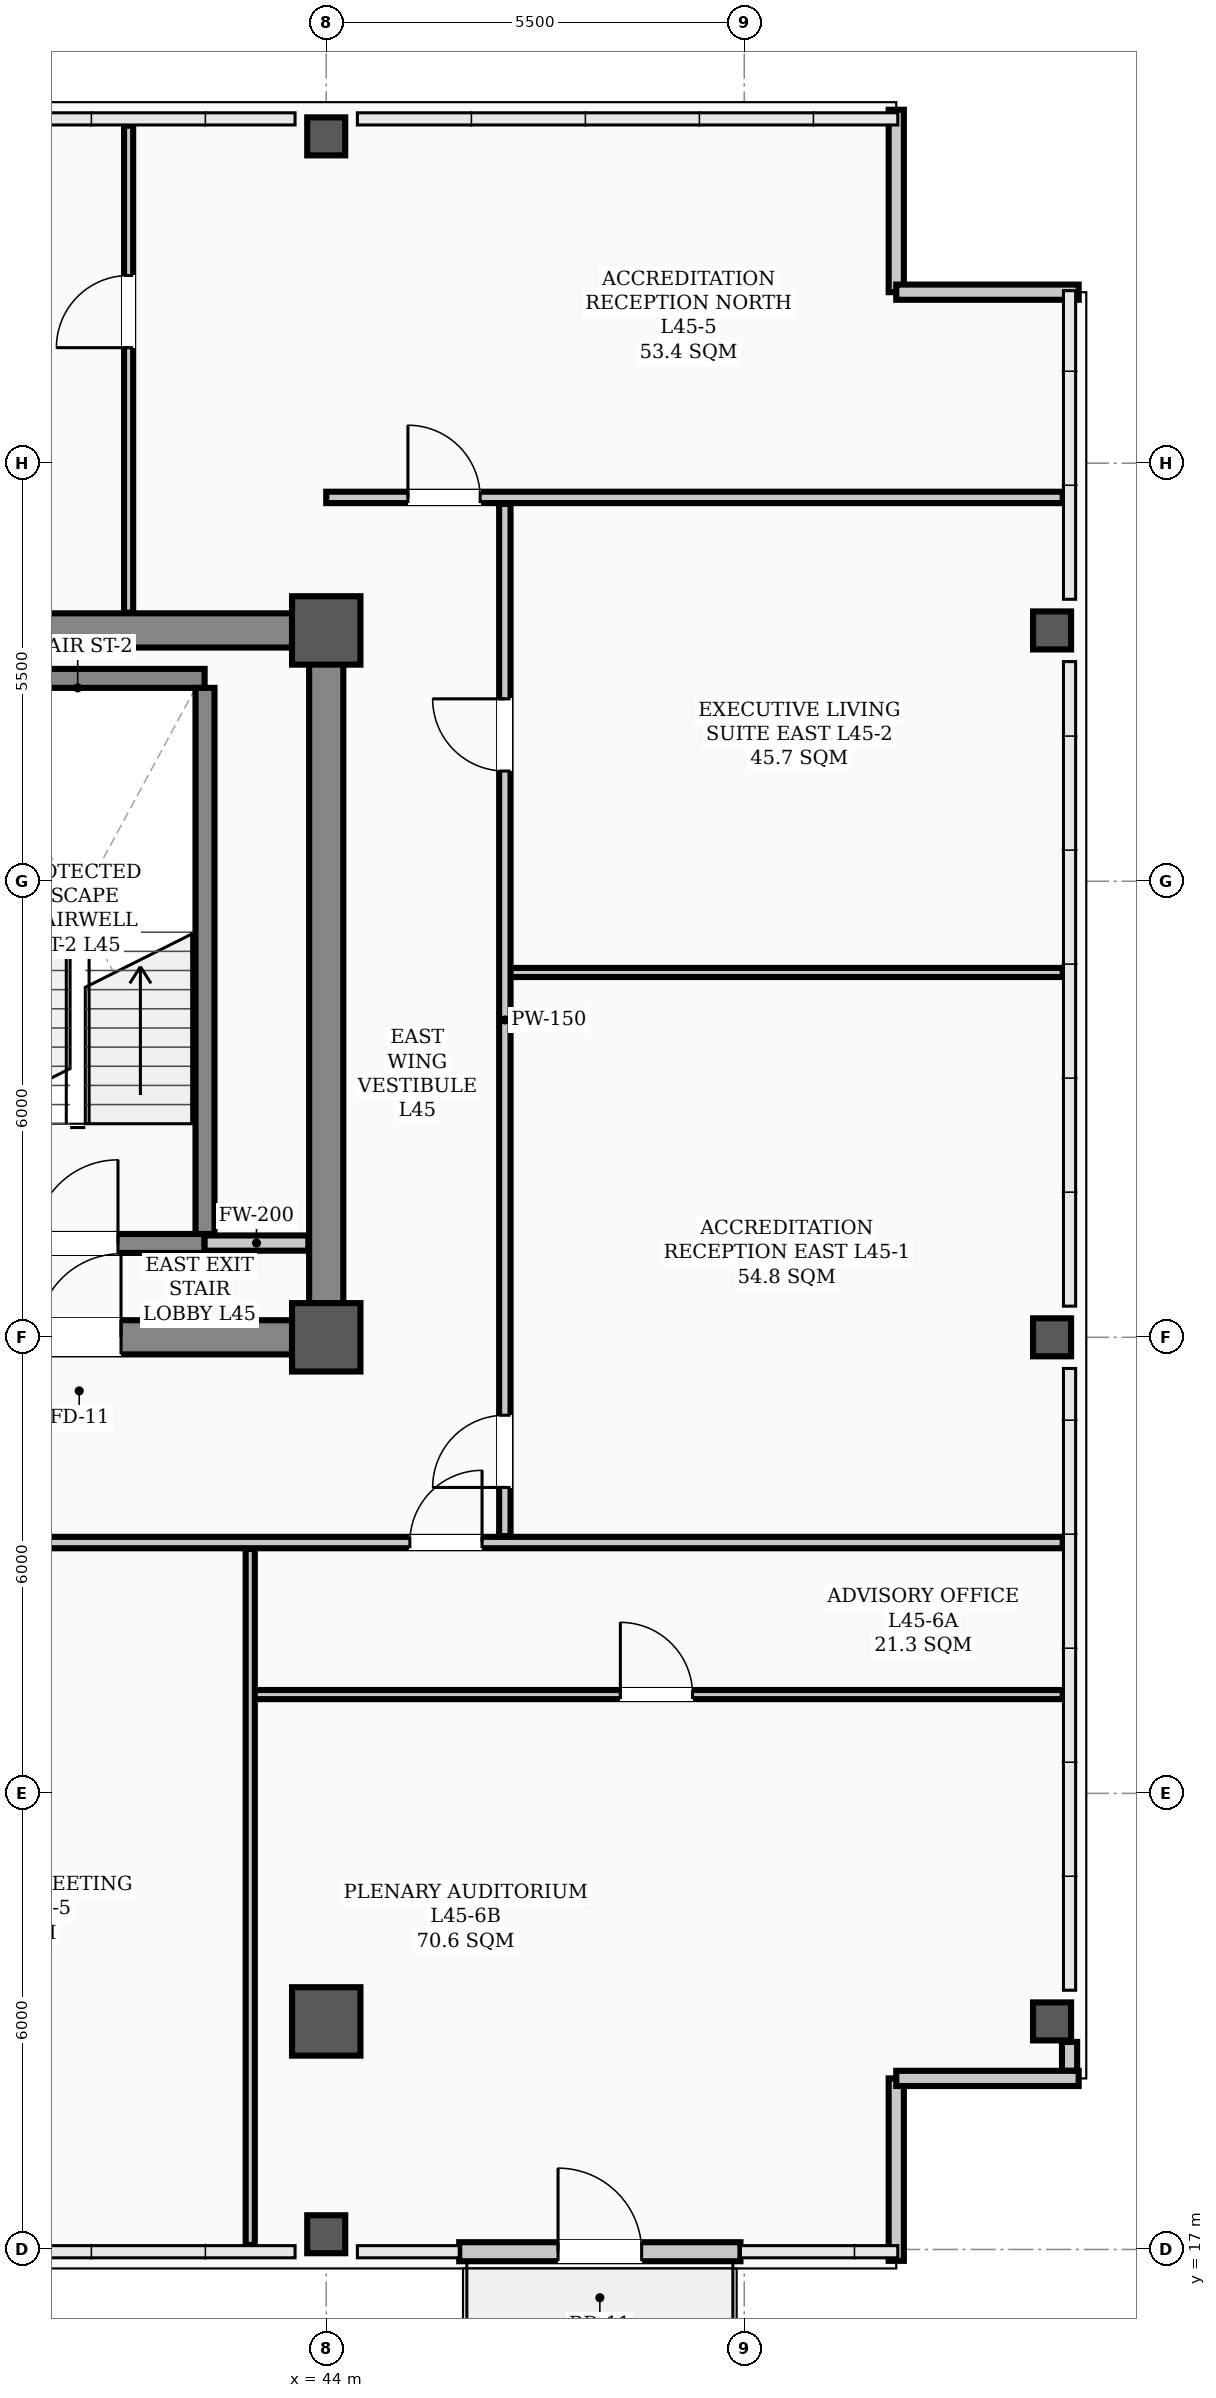
"""IFC4 building model, lengths in metres.
Left out: names, types, materials, properties, quantities, classifications, styles, units other than length and angle.
Written with IfcOpenShell. Run it as: python <this file> out.ifc"""

import sys

from ifc_helpers import new_model, si_unit, direction, frame, frame_2d, origin, origin_2d, place, context, subcontext, project, spatial, rectangle, hollow_rectangle, extrude, element, fill, save


model = new_model("IFC4")
c1 = context("Model", 3, precision=1e-05, world=origin(), true_north=direction((0.0, 1.0)))
c2 = subcontext(c1, "Body", "Model", "MODEL_VIEW")
j1 = project(units=[si_unit("LENGTHUNIT", "METRE"), si_unit("PLANEANGLEUNIT", "RADIAN")], contexts=[c1])
p1 = place(None, origin())
s1 = spatial("IfcSite", under=j1, at=p1, CompositionType="ELEMENT")
p2 = place(p1, origin())
s2 = spatial("IfcBuilding", under=s1, at=p2, CompositionType="ELEMENT")
p3 = place(p2, frame((0.0, 0.0, 181.2)))
s3 = spatial("IfcBuildingStorey", under=s2, at=p3, CompositionType="ELEMENT", Elevation=181.2)
for number, where, z_axis, x_axis in (
    (1, (44.0, 29.0, 0.0), (0.0, 0.0, 1.0), (1.0, 0.0, 0.0)),
    (2, (44.0, 38.3, 0.0), (0.0, 0.0, 1.0), (1.0, 0.0, 0.0)),
    (3, (44.0, 20.0, 0.0), (0.0, 0.0, 1.0), (1.0, 0.0, 0.0)),
):
    element("IfcColumn", number, at=place(p3, frame(where, z_axis=z_axis, x_axis=x_axis)), inside=s3, PredefinedType="COLUMN", context=c2, shape_type="SweptSolid", body=[
        extrude(hollow_rectangle(XDim=0.9, YDim=0.9, WallThickness=0.035, InnerFilletRadius=0.017, OuterFilletRadius=0.052, at=origin_2d()), origin(), (0.0, 0.0, 1.0), 3.9),
    ])
for number, where, z_axis, x_axis in (
    (4, (44.0, 17.2, 0.0), (0.0, 0.0, 1.0), (1.0, 0.0, 0.0)),
    (5, (44.0, 44.8, 0.0), (0.0, 0.0, 1.0), (1.0, 0.0, 0.0)),
    (6, (53.55, 20.0, 0.0), (0.0, 0.0, 1.0), (1.0, 0.0, 0.0)),
    (7, (53.55, 29.0, 0.0), (0.0, 0.0, 1.0), (1.0, 0.0, 0.0)),
    (8, (53.55, 38.3, 0.0), (0.0, 0.0, 1.0), (1.0, 0.0, 0.0)),
):
    element("IfcColumn", number, at=place(p3, frame(where, z_axis=z_axis, x_axis=x_axis)), inside=s3, PredefinedType="COLUMN", context=c2, shape_type="SweptSolid", body=[
        extrude(hollow_rectangle(XDim=0.5, YDim=0.5, WallThickness=0.024, InnerFilletRadius=0.012, OuterFilletRadius=0.036, at=origin_2d()), origin(), (0.0, 0.0, 1.0), 3.9),
    ])
p4 = place(p3, frame((53.78, 19.35, 0.0), z_axis=(0.0, 0.0, 1.0), x_axis=(0.0, 1.0, 0.0)))
e9 = element("IfcWall", 9, at=p4, inside=s3, PredefinedType="PARAPET", context=c2, shape_type="SweptSolid", body=[
    extrude(rectangle(XDim=0.38, YDim=0.2, at=frame_2d((0.19, 0.0))), origin(), (0.0, 0.0, 1.0), 1.2),
])
for number, where, z_axis, x_axis in (
    (10, (51.5, 16.85, 0.0), (0.0, 0.0, 1.0), (0.0, 1.0, 0.0)),
    (11, (51.5, 19.25, 0.0), (0.0, 0.0, 1.0), (1.0, 0.0, 0.0)),
    (12, (51.5, 45.15, 0.0), (0.0, 0.0, 1.0), (0.0, -1.0, 0.0)),
    (13, (51.5, 42.75, 0.0), (0.0, 0.0, 1.0), (1.0, 0.0, 0.0)),
):
    element("IfcWall", number, at=place(p3, frame(where, z_axis=z_axis, x_axis=x_axis)), inside=s3, PredefinedType="PARAPET", context=c2, shape_type="SweptSolid", body=[
        extrude(rectangle(XDim=2.4, YDim=0.2, at=frame_2d((1.2, 0.0))), origin(), (0.0, 0.0, 1.0), 1.2),
    ])
p5 = place(p3, frame((45.75, 16.97, 0.0), z_axis=(0.0, 0.0, 1.0), x_axis=(1.0, 0.0, 0.0)))
e14 = element("IfcWall", 14, at=p5, inside=s3, PredefinedType="STANDARD", context=c2, shape_type="SweptSolid", body=[
    extrude(rectangle(XDim=3.7, YDim=0.25, at=frame_2d((1.85, 0.0))), origin(), (0.0, 0.0, 1.0), 3.18),
])
p6 = place(p5, frame((1.3, 0.0, 0.0)))
e15 = element("IfcOpeningElement", 15, at=p6, cuts=e14, PredefinedType="OPENING", context=c2, shape_type="SweptSolid", body=[
    extrude(rectangle(XDim=1.1, YDim=2.2, at=frame_2d((0.55, 1.1))), frame((0.0, 0.135, 0.0), z_axis=(0.0, -1.0, 0.0), x_axis=(1.0, 0.0, 0.0)), (0.0, 0.0, 1.0), 0.27),
])
p7 = place(p3, frame((13.5, 29.0, 0.0), z_axis=(0.0, 0.0, 1.0), x_axis=(1.0, 0.0, 0.0)))
e16 = element("IfcWall", 16, at=p7, inside=s3, PredefinedType="SHEAR", context=c2, shape_type="SweptSolid", body=[
    extrude(rectangle(XDim=30.5, YDim=0.45, at=frame_2d((15.25, 0.0))), origin(), (0.0, 0.0, 1.0), 3.72),
])
p8 = place(p7, frame((1.75, 0.0, 0.0)))
e17 = element("IfcOpeningElement", 17, at=p8, cuts=e16, PredefinedType="OPENING", context=c2, shape_type="SweptSolid", body=[
    extrude(rectangle(XDim=1.1, YDim=2.08, at=frame_2d((0.55, 1.04))), frame((0.0, 0.235, 0.0), z_axis=(0.0, -1.0, 0.0), x_axis=(1.0, 0.0, 0.0)), (0.0, 0.0, 1.0), 0.47),
])
p9 = place(p7, frame((26.7, 0.0, 0.0)))
e18 = element("IfcOpeningElement", 18, at=p9, cuts=e16, PredefinedType="OPENING", context=c2, shape_type="SweptSolid", body=[
    extrude(rectangle(XDim=1.1, YDim=2.08, at=frame_2d((0.55, 1.04))), frame((0.0, 0.235, 0.0), z_axis=(0.0, -1.0, 0.0), x_axis=(1.0, 0.0, 0.0)), (0.0, 0.0, 1.0), 0.47),
])
p10 = place(p7, frame((6.8, 0.0, 0.0)))
e19 = element("IfcOpeningElement", 19, at=p10, cuts=e16, PredefinedType="OPENING", context=c2, shape_type="SweptSolid", body=[
    extrude(rectangle(XDim=1.1, YDim=2.08, at=frame_2d((0.55, 1.04))), frame((0.0, 0.235, 0.0), z_axis=(0.0, -1.0, 0.0), x_axis=(1.0, 0.0, 0.0)), (0.0, 0.0, 1.0), 0.47),
])
p11 = place(p7, frame((13.2, 0.0, 0.0)))
e20 = element("IfcOpeningElement", 20, at=p11, cuts=e16, PredefinedType="OPENING", context=c2, shape_type="SweptSolid", body=[
    extrude(rectangle(XDim=1.6, YDim=2.08, at=frame_2d((0.8, 1.04))), frame((0.0, 0.235, 0.0), z_axis=(0.0, -1.0, 0.0), x_axis=(1.0, 0.0, 0.0)), (0.0, 0.0, 1.0), 0.47),
])
p12 = place(p7, frame((19.5, 0.0, 0.0)))
e21 = element("IfcOpeningElement", 21, at=p12, cuts=e16, PredefinedType="OPENING", context=c2, shape_type="SweptSolid", body=[
    extrude(rectangle(XDim=0.9, YDim=2.08, at=frame_2d((0.45, 1.04))), frame((0.0, 0.235, 0.0), z_axis=(0.0, -1.0, 0.0), x_axis=(1.0, 0.0, 0.0)), (0.0, 0.0, 1.0), 0.47),
])
p13 = place(p7, frame((21.55, 0.0, 0.0)))
e22 = element("IfcOpeningElement", 22, at=p13, cuts=e16, PredefinedType="OPENING", context=c2, shape_type="SweptSolid", body=[
    extrude(rectangle(XDim=0.9, YDim=2.08, at=frame_2d((0.45, 1.04))), frame((0.0, 0.235, 0.0), z_axis=(0.0, -1.0, 0.0), x_axis=(1.0, 0.0, 0.0)), (0.0, 0.0, 1.0), 0.47),
])
p14 = place(p3, frame((13.5, 38.3, 0.0), z_axis=(0.0, 0.0, 1.0), x_axis=(1.0, 0.0, 0.0)))
e23 = element("IfcWall", 23, at=p14, inside=s3, PredefinedType="SHEAR", context=c2, shape_type="SweptSolid", body=[
    extrude(rectangle(XDim=30.5, YDim=0.45, at=frame_2d((15.25, 0.0))), origin(), (0.0, 0.0, 1.0), 3.72),
])
p15 = place(p3, frame((44.0, 29.35, 0.0), z_axis=(0.0, 0.0, 1.0), x_axis=(0.0, 1.0, 0.0)))
e24 = element("IfcWall", 24, at=p15, inside=s3, PredefinedType="SHEAR", context=c2, shape_type="SweptSolid", body=[
    extrude(rectangle(XDim=8.6, YDim=0.45, at=frame_2d((4.3, 0.0))), origin(), (0.0, 0.0, 1.0), 3.72),
])
p16 = place(p3, frame((39.06, 30.235, 0.0), z_axis=(0.0, 0.0, 1.0), x_axis=(1.0, 0.0, 0.0)))
e25 = element("IfcWall", 25, at=p16, inside=s3, PredefinedType="STANDARD", context=c2, shape_type="SweptSolid", body=[
    extrude(rectangle(XDim=3.34, YDim=0.25, at=frame_2d((1.67, 0.0))), origin(), (0.0, 0.0, 1.0), 3.72),
])
p17 = place(p16, frame((1.1, 0.0, 0.0)))
e26 = element("IfcOpeningElement", 26, at=p17, cuts=e25, PredefinedType="OPENING", context=c2, shape_type="SweptSolid", body=[
    extrude(rectangle(XDim=1.1, YDim=2.08, at=frame_2d((0.55, 1.04))), frame((0.0, 0.135, 0.0), z_axis=(0.0, -1.0, 0.0), x_axis=(1.0, 0.0, 0.0)), (0.0, 0.0, 1.0), 0.27),
])
p18 = place(p3, frame((39.06, 37.669, 0.0), z_axis=(0.0, 0.0, 1.0), x_axis=(1.0, 0.0, 0.0)))
e27 = element("IfcWall", 27, at=p18, inside=s3, PredefinedType="STANDARD", context=c2, shape_type="SweptSolid", body=[
    extrude(rectangle(XDim=3.34, YDim=0.25, at=frame_2d((1.67, 0.0))), origin(), (0.0, 0.0, 1.0), 3.72),
])
p19 = place(p3, frame((42.405, 30.36, 0.0), z_axis=(0.0, 0.0, 1.0), x_axis=(0.0, 1.0, 0.0)))
e28 = element("IfcWall", 28, at=p19, inside=s3, PredefinedType="STANDARD", context=c2, shape_type="SweptSolid", body=[
    extrude(rectangle(XDim=7.184, YDim=0.25, at=frame_2d((3.592, 0.0))), origin(), (0.0, 0.0, 1.0), 3.72),
])
p20 = place(p3, frame((42.4, 30.24, 0.0), z_axis=(0.0, 0.0, 1.0), x_axis=(1.0, 0.0, 0.0)))
e29 = element("IfcWall", 29, at=p20, inside=s3, PredefinedType="STANDARD", context=c2, shape_type="SweptSolid", body=[
    extrude(rectangle(XDim=1.365, YDim=0.2, at=frame_2d((0.683, 0.0))), origin(), (0.0, 0.0, 1.0), 3.2),
])
p21 = place(p3, frame((10.31, 26.3, 0.0), z_axis=(0.0, 0.0, 1.0), x_axis=(1.0, 0.0, 0.0)))
e30 = element("IfcWall", 30, at=p21, inside=s3, PredefinedType="PARTITIONING", context=c2, shape_type="SweptSolid", body=[
    extrude(rectangle(XDim=43.38, YDim=0.15, at=frame_2d((21.69, 0.0))), origin(), (0.0, 0.0, 1.0), 3.2),
])
p22 = place(p21, frame((0.575, 0.0, 0.0)))
e31 = element("IfcOpeningElement", 31, at=p22, cuts=e30, PredefinedType="OPENING", context=c2, shape_type="SweptSolid", body=[
    extrude(rectangle(XDim=0.95, YDim=2.08, at=frame_2d((0.475, 1.04))), frame((0.0, 0.085, 0.0), z_axis=(0.0, -1.0, 0.0), x_axis=(1.0, 0.0, 0.0)), (0.0, 0.0, 1.0), 0.17),
])
p23 = place(p21, frame((9.415, 0.0, 0.0)))
e32 = element("IfcOpeningElement", 32, at=p23, cuts=e30, PredefinedType="OPENING", context=c2, shape_type="SweptSolid", body=[
    extrude(rectangle(XDim=0.95, YDim=2.08, at=frame_2d((0.475, 1.04))), frame((0.0, 0.085, 0.0), z_axis=(0.0, -1.0, 0.0), x_axis=(1.0, 0.0, 0.0)), (0.0, 0.0, 1.0), 0.17),
])
p24 = place(p21, frame((16.115, 0.0, 0.0)))
e33 = element("IfcOpeningElement", 33, at=p24, cuts=e30, PredefinedType="OPENING", context=c2, shape_type="SweptSolid", body=[
    extrude(rectangle(XDim=0.95, YDim=2.08, at=frame_2d((0.475, 1.04))), frame((0.0, 0.085, 0.0), z_axis=(0.0, -1.0, 0.0), x_axis=(1.0, 0.0, 0.0)), (0.0, 0.0, 1.0), 0.17),
])
p25 = place(p21, frame((22.715, 0.0, 0.0)))
e34 = element("IfcOpeningElement", 34, at=p25, cuts=e30, PredefinedType="OPENING", context=c2, shape_type="SweptSolid", body=[
    extrude(rectangle(XDim=0.95, YDim=2.08, at=frame_2d((0.475, 1.04))), frame((0.0, 0.085, 0.0), z_axis=(0.0, -1.0, 0.0), x_axis=(1.0, 0.0, 0.0)), (0.0, 0.0, 1.0), 0.17),
])
p26 = place(p21, frame((29.015, 0.0, 0.0)))
e35 = element("IfcOpeningElement", 35, at=p26, cuts=e30, PredefinedType="OPENING", context=c2, shape_type="SweptSolid", body=[
    extrude(rectangle(XDim=0.95, YDim=2.08, at=frame_2d((0.475, 1.04))), frame((0.0, 0.085, 0.0), z_axis=(0.0, -1.0, 0.0), x_axis=(1.0, 0.0, 0.0)), (0.0, 0.0, 1.0), 0.17),
])
p27 = place(p21, frame((34.79, 0.0, 0.0)))
e36 = element("IfcOpeningElement", 36, at=p27, cuts=e30, PredefinedType="OPENING", context=c2, shape_type="SweptSolid", body=[
    extrude(rectangle(XDim=0.95, YDim=2.08, at=frame_2d((0.475, 1.04))), frame((0.0, 0.085, 0.0), z_axis=(0.0, -1.0, 0.0), x_axis=(1.0, 0.0, 0.0)), (0.0, 0.0, 1.0), 0.17),
])
p28 = place(p3, frame((43.0, 24.3, 0.0), z_axis=(0.0, 0.0, 1.0), x_axis=(1.0, 0.0, 0.0)))
e37 = element("IfcWall", 37, at=p28, inside=s3, PredefinedType="PARTITIONING", context=c2, shape_type="SweptSolid", body=[
    extrude(rectangle(XDim=10.69, YDim=0.12, at=frame_2d((5.345, 0.0))), origin(), (0.0, 0.0, 1.0), 3.2),
])
p29 = place(p28, frame((4.87, 0.0, 0.0)))
e38 = element("IfcOpeningElement", 38, at=p29, cuts=e37, PredefinedType="OPENING", context=c2, shape_type="SweptSolid", body=[
    extrude(rectangle(XDim=0.95, YDim=2.08, at=frame_2d((0.475, 1.04))), frame((0.0, 0.07, 0.0), z_axis=(0.0, -1.0, 0.0), x_axis=(1.0, 0.0, 0.0)), (0.0, 0.0, 1.0), 0.14),
])
p30 = place(p3, frame((46.35, 33.8, 0.0), z_axis=(0.0, 0.0, 1.0), x_axis=(1.0, 0.0, 0.0)))
e39 = element("IfcWall", 39, at=p30, inside=s3, PredefinedType="PARTITIONING", context=c2, shape_type="SweptSolid", body=[
    extrude(rectangle(XDim=7.34, YDim=0.12, at=frame_2d((3.67, 0.0))), origin(), (0.0, 0.0, 1.0), 3.212),
])
p31 = place(p3, frame((44.0, 40.05, 0.0), z_axis=(0.0, 0.0, 1.0), x_axis=(1.0, 0.0, 0.0)))
e40 = element("IfcWall", 40, at=p31, inside=s3, PredefinedType="PARTITIONING", context=c2, shape_type="SweptSolid", body=[
    extrude(rectangle(XDim=9.69, YDim=0.15, at=frame_2d((4.845, 0.0))), origin(), (0.0, 0.0, 1.0), 3.2),
])
p32 = place(p31, frame((1.075, 0.0, 0.0)))
e41 = element("IfcOpeningElement", 41, at=p32, cuts=e40, PredefinedType="OPENING", context=c2, shape_type="SweptSolid", body=[
    extrude(rectangle(XDim=0.95, YDim=2.08, at=frame_2d((0.475, 1.04))), frame((0.0, 0.085, 0.0), z_axis=(0.0, -1.0, 0.0), x_axis=(1.0, 0.0, 0.0)), (0.0, 0.0, 1.0), 0.17),
])
p33 = place(p3, frame((46.35, 26.385, 0.0), z_axis=(0.0, 0.0, 1.0), x_axis=(0.0, 1.0, 0.0)))
e42 = element("IfcWall", 42, at=p33, inside=s3, PredefinedType="PARTITIONING", context=c2, shape_type="SweptSolid", body=[
    extrude(rectangle(XDim=13.58, YDim=0.15, at=frame_2d((6.79, 0.0))), origin(), (0.0, 0.0, 1.0), 3.1),
])
p34 = place(p33, frame((0.64, 0.0, 0.0)))
e43 = element("IfcOpeningElement", 43, at=p34, cuts=e42, PredefinedType="OPENING", context=c2, shape_type="SweptSolid", body=[
    extrude(rectangle(XDim=0.95, YDim=2.08, at=frame_2d((0.475, 1.04))), frame((0.0, 0.085, 0.0), z_axis=(0.0, -1.0, 0.0), x_axis=(1.0, 0.0, 0.0)), (0.0, 0.0, 1.0), 0.17),
])
p35 = place(p33, frame((10.065, 0.0, 0.0)))
e44 = element("IfcOpeningElement", 44, at=p35, cuts=e42, PredefinedType="OPENING", context=c2, shape_type="SweptSolid", body=[
    extrude(rectangle(XDim=0.95, YDim=2.08, at=frame_2d((0.475, 1.04))), frame((0.0, 0.085, 0.0), z_axis=(0.0, -1.0, 0.0), x_axis=(1.0, 0.0, 0.0)), (0.0, 0.0, 1.0), 0.17),
])
p36 = place(p3, frame((43.0, 17.06, 0.0), z_axis=(0.0, 0.0, 1.0), x_axis=(0.0, 1.0, 0.0)))
e45 = element("IfcWall", 45, at=p36, inside=s3, PredefinedType="PARTITIONING", context=c2, shape_type="SweptSolid", body=[
    extrude(rectangle(XDim=9.155, YDim=0.12, at=frame_2d((4.578, 0.0))), origin(), (0.0, 0.0, 1.0), 3.1),
])
p37 = place(p3, frame((41.4, 38.535, 0.0), z_axis=(0.0, 0.0, 1.0), x_axis=(0.0, 1.0, 0.0)))
e46 = element("IfcWall", 46, at=p37, inside=s3, PredefinedType="PARTITIONING", context=c2, shape_type="SweptSolid", body=[
    extrude(rectangle(XDim=6.405, YDim=0.12, at=frame_2d((3.203, 0.0))), origin(), (0.0, 0.0, 1.0), 3.212),
])
p38 = place(p37, frame((3.485, 0.0, 0.0)))
e47 = element("IfcOpeningElement", 47, at=p38, cuts=e46, PredefinedType="OPENING", context=c2, shape_type="SweptSolid", body=[
    extrude(rectangle(XDim=0.95, YDim=2.08, at=frame_2d((0.475, 1.04))), frame((0.0, 0.07, 0.0), z_axis=(0.0, -1.0, 0.0), x_axis=(1.0, 0.0, 0.0)), (0.0, 0.0, 1.0), 0.14),
])
p39 = place(p6, origin())
e48 = element("IfcDoor", 48, at=p39, inside=s3, OperationType="SINGLE_SWING_LEFT", PredefinedType="DOOR", context=c2, shape_type="SweptSolid", body=[
    extrude(rectangle(XDim=1.1, YDim=2.2, at=frame_2d((0.55, 1.1))), frame((0.0, 0.025, 0.0), z_axis=(0.0, -1.0, 0.0), x_axis=(1.0, 0.0, 0.0)), (0.0, 0.0, 1.0), 0.05),
])
fill(e15, e48)
p40 = place(p17, origin())
e49 = element("IfcDoor", 49, at=p40, inside=s3, OperationType="SINGLE_SWING_RIGHT", PredefinedType="DOOR", context=c2, shape_type="SweptSolid", body=[
    extrude(rectangle(XDim=1.1, YDim=2.08, at=frame_2d((0.55, 1.04))), frame((0.0, 0.025, 0.0), z_axis=(0.0, -1.0, 0.0), x_axis=(1.0, 0.0, 0.0)), (0.0, 0.0, 1.0), 0.05),
])
fill(e26, e49)
p41 = place(p9, origin())
e50 = element("IfcDoor", 50, at=p41, inside=s3, OperationType="SINGLE_SWING_RIGHT", PredefinedType="DOOR", context=c2, shape_type="SweptSolid", body=[
    extrude(rectangle(XDim=1.1, YDim=2.08, at=frame_2d((0.55, 1.04))), frame((0.0, 0.025, 0.0), z_axis=(0.0, -1.0, 0.0), x_axis=(1.0, 0.0, 0.0)), (0.0, 0.0, 1.0), 0.05),
])
fill(e18, e50)
p42 = place(p29, origin())
e51 = element("IfcDoor", 51, at=p42, inside=s3, OperationType="SINGLE_SWING_LEFT", PredefinedType="DOOR", context=c2, shape_type="SweptSolid", body=[
    extrude(rectangle(XDim=0.95, YDim=2.08, at=frame_2d((0.475, 1.04))), frame((0.0, 0.025, 0.0), z_axis=(0.0, -1.0, 0.0), x_axis=(1.0, 0.0, 0.0)), (0.0, 0.0, 1.0), 0.05),
])
fill(e38, e51)
p43 = place(p27, origin())
e52 = element("IfcDoor", 52, at=p43, inside=s3, OperationType="SINGLE_SWING_RIGHT", PredefinedType="DOOR", context=c2, shape_type="SweptSolid", body=[
    extrude(rectangle(XDim=0.95, YDim=2.08, at=frame_2d((0.475, 1.04))), frame((0.0, 0.025, 0.0), z_axis=(0.0, -1.0, 0.0), x_axis=(1.0, 0.0, 0.0)), (0.0, 0.0, 1.0), 0.05),
])
fill(e36, e52)
p44 = place(p34, origin())
e53 = element("IfcDoor", 53, at=p44, inside=s3, OperationType="SINGLE_SWING_LEFT", PredefinedType="DOOR", context=c2, shape_type="SweptSolid", body=[
    extrude(rectangle(XDim=0.95, YDim=2.08, at=frame_2d((0.475, 1.04))), frame((0.0, 0.025, 0.0), z_axis=(0.0, -1.0, 0.0), x_axis=(1.0, 0.0, 0.0)), (0.0, 0.0, 1.0), 0.05),
])
fill(e43, e53)
p45 = place(p35, origin())
e54 = element("IfcDoor", 54, at=p45, inside=s3, OperationType="SINGLE_SWING_RIGHT", PredefinedType="DOOR", context=c2, shape_type="SweptSolid", body=[
    extrude(rectangle(XDim=0.95, YDim=2.08, at=frame_2d((0.475, 1.04))), frame((0.0, 0.025, 0.0), z_axis=(0.0, -1.0, 0.0), x_axis=(1.0, 0.0, 0.0)), (0.0, 0.0, 1.0), 0.05),
])
fill(e44, e54)
p46 = place(p32, origin())
e55 = element("IfcDoor", 55, at=p46, inside=s3, OperationType="SINGLE_SWING_LEFT", PredefinedType="DOOR", context=c2, shape_type="SweptSolid", body=[
    extrude(rectangle(XDim=0.95, YDim=2.08, at=frame_2d((0.475, 1.04))), frame((0.0, 0.025, 0.0), z_axis=(0.0, -1.0, 0.0), x_axis=(1.0, 0.0, 0.0)), (0.0, 0.0, 1.0), 0.05),
])
fill(e41, e55)
p47 = place(p38, origin())
e56 = element("IfcDoor", 56, at=p47, inside=s3, OperationType="SINGLE_SWING_LEFT", PredefinedType="DOOR", context=c2, shape_type="SweptSolid", body=[
    extrude(rectangle(XDim=0.95, YDim=2.08, at=frame_2d((0.475, 1.04))), frame((0.0, 0.025, 0.0), z_axis=(0.0, -1.0, 0.0), x_axis=(1.0, 0.0, 0.0)), (0.0, 0.0, 1.0), 0.05),
])
fill(e47, e56)
save(model, sys.argv[1])
